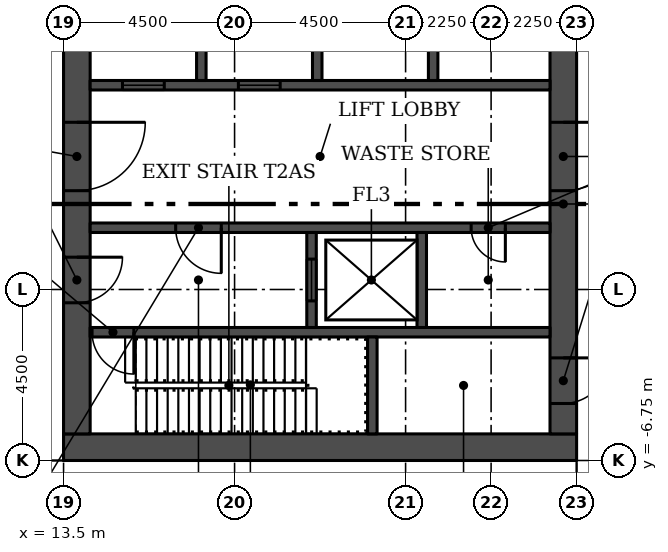
"""IFC4 building model, lengths in metres.
Left out: names, types, materials, properties, quantities, classifications, styles, units other than length and angle.
Written with IfcOpenShell. Run it as: python <this file> out.ifc"""

import sys

from ifc_helpers import new_model, si_unit, direction, frame, frame_2d, origin, place, context, subcontext, project, spatial, rectangle, extrude, element, fill, save


model = new_model("IFC4")
c1 = context("Model", 3, precision=1e-05, world=origin(), true_north=direction((0.0, 1.0)))
c2 = subcontext(c1, "Body", "Model", "MODEL_VIEW")
j1 = project(units=[si_unit("LENGTHUNIT", "METRE"), si_unit("PLANEANGLEUNIT", "RADIAN")], contexts=[c1])
p1 = place(None, origin())
s1 = spatial("IfcSite", under=j1, at=p1, CompositionType="ELEMENT")
p2 = place(p1, origin())
s2 = spatial("IfcBuilding", under=s1, at=p2, CompositionType="ELEMENT")
p3 = place(p2, origin())
s3 = spatial("IfcBuildingStorey", under=s2, at=p3, CompositionType="ELEMENT", Elevation=0.0)
p4 = place(p3, frame((27.0, -6.75, 0.0), z_axis=(0.0, 0.0, 1.0), x_axis=(0.0, -1.0, 0.0)))
e1 = element("IfcWall", 1, at=p4, inside=s3, PredefinedType="PARTITIONING", context=c2, shape_type="SweptSolid", body=[
    extrude(rectangle(XDim=22.375, YDim=0.25, at=frame_2d((11.188, 0.0))), origin(), (0.0, 0.0, 1.0), 12.1),
])
p5 = place(p4, frame((10.05, 0.0, 0.0)))
e2 = element("IfcOpeningElement", 2, at=p5, cuts=e1, PredefinedType="OPENING", context=c2, shape_type="SweptSolid", body=[
    extrude(rectangle(XDim=1.8, YDim=2.4, at=frame_2d((0.9, 1.2))), frame((0.0, 0.135, 0.0), z_axis=(0.0, -1.0, 0.0), x_axis=(1.0, 0.0, 0.0)), (0.0, 0.0, 1.0), 0.27),
])
p6 = place(p3, frame((-13.5, -6.75, 0.0)))
e3 = element("IfcWall", 3, at=p6, inside=s3, PredefinedType="PARTITIONING", context=c2, shape_type="SweptSolid", body=[
    extrude(rectangle(XDim=27.0, YDim=0.25, at=frame_2d((13.5, 0.0))), origin(), (0.0, 0.0, 1.0), 12.1),
])
p7 = place(p6, frame((14.25, 0.0, 0.0)))
e4 = element("IfcOpeningElement", 4, at=p7, cuts=e3, PredefinedType="OPENING", context=c2, shape_type="SweptSolid", body=[
    extrude(rectangle(XDim=1.8, YDim=2.4, at=frame_2d((0.9, 1.2))), frame((0.0, 0.135, 0.0), z_axis=(0.0, -1.0, 0.0), x_axis=(1.0, 0.0, 0.0)), (0.0, 0.0, 1.0), 0.27),
])
p8 = place(p2, frame((0.0, 0.0, 6.5)))
s4 = spatial("IfcBuildingStorey", under=s2, at=p8, CompositionType="ELEMENT", Elevation=6.5)
p9 = place(p8, frame((13.5, -6.4, 0.0)))
e5 = element("IfcWall", 5, at=p9, inside=s4, PredefinedType="SHEAR", context=c2, shape_type="SweptSolid", body=[
    extrude(rectangle(XDim=13.5, YDim=0.7, at=frame_2d((6.75, 0.0))), origin(), (0.0, 0.0, 1.0), 5.6),
])
p10 = place(p8, frame((13.85, 6.05, 0.0), z_axis=(0.0, 0.0, 1.0), x_axis=(0.0, -1.0, 0.0)))
e6 = element("IfcWall", 6, at=p10, inside=s4, PredefinedType="SHEAR", context=c2, shape_type="SweptSolid", body=[
    extrude(rectangle(XDim=12.1, YDim=0.7, at=frame_2d((6.05, 0.0))), origin(), (0.0, 0.0, 1.0), 5.6),
])
p11 = place(p10, frame((7.45, 0.0, 0.0)))
e7 = element("IfcOpeningElement", 7, at=p11, cuts=e6, PredefinedType="OPENING", context=c2, shape_type="SweptSolid", body=[
    extrude(rectangle(XDim=1.2, YDim=2.1, at=frame_2d((0.6, 1.05))), frame((0.0, 0.36, 0.0), z_axis=(0.0, -1.0, 0.0), x_axis=(1.0, 0.0, 0.0)), (0.0, 0.0, 1.0), 0.72),
])
p12 = place(p10, frame((3.9, 0.0, 0.0)))
e8 = element("IfcOpeningElement", 8, at=p12, cuts=e6, PredefinedType="OPENING", context=c2, shape_type="SweptSolid", body=[
    extrude(rectangle(XDim=1.8, YDim=2.4, at=frame_2d((0.9, 1.2))), frame((0.0, 0.36, 0.0), z_axis=(0.0, -1.0, 0.0), x_axis=(1.0, 0.0, 0.0)), (0.0, 0.0, 1.0), 0.72),
])
p13 = place(p8, frame((26.65, 6.05, 0.0), z_axis=(0.0, 0.0, 1.0), x_axis=(0.0, -1.0, 0.0)))
e9 = element("IfcWall", 9, at=p13, inside=s4, PredefinedType="SHEAR", context=c2, shape_type="SweptSolid", body=[
    extrude(rectangle(XDim=12.1, YDim=0.7, at=frame_2d((6.05, 0.0))), origin(), (0.0, 0.0, 1.0), 5.6),
])
p14 = place(p13, frame((10.1, 0.0, 0.0)))
e10 = element("IfcOpeningElement", 10, at=p14, cuts=e9, PredefinedType="OPENING", context=c2, shape_type="SweptSolid", body=[
    extrude(rectangle(XDim=1.2, YDim=2.1, at=frame_2d((0.6, 1.05))), frame((0.0, 0.36, 0.0), z_axis=(0.0, -1.0, 0.0), x_axis=(1.0, 0.0, 0.0)), (0.0, 0.0, 1.0), 0.72),
])
p15 = place(p13, frame((3.9, 0.0, 0.0)))
e11 = element("IfcOpeningElement", 11, at=p15, cuts=e9, PredefinedType="OPENING", context=c2, shape_type="SweptSolid", body=[
    extrude(rectangle(XDim=1.8, YDim=2.4, at=frame_2d((0.9, 1.2))), frame((0.0, 0.36, 0.0), z_axis=(0.0, -1.0, 0.0), x_axis=(1.0, 0.0, 0.0)), (0.0, 0.0, 1.0), 0.72),
])
p16 = place(p8, frame((26.3, -3.375, 0.0), z_axis=(0.0, 0.0, 1.0), x_axis=(-1.0, 0.0, 0.0)))
e12 = element("IfcWall", 12, at=p16, inside=s4, PredefinedType="SHEAR", context=c2, shape_type="SweptSolid", body=[
    extrude(rectangle(XDim=12.1, YDim=0.25, at=frame_2d((6.05, 0.0))), origin(), (0.0, 0.0, 1.0), 5.6),
])
p17 = place(p16, frame((10.95, 0.0, 0.0)))
e13 = element("IfcOpeningElement", 13, at=p17, cuts=e12, PredefinedType="OPENING", context=c2, shape_type="SweptSolid", body=[
    extrude(rectangle(XDim=1.1, YDim=2.1, at=frame_2d((0.55, 1.05))), frame((0.0, 0.135, 0.0), z_axis=(0.0, -1.0, 0.0), x_axis=(1.0, 0.0, 0.0)), (0.0, 0.0, 1.0), 0.27),
])
p18 = place(p8, frame((21.625, -6.05, 0.0), z_axis=(0.0, 0.0, 1.0), x_axis=(0.0, 1.0, 0.0)))
e14 = element("IfcWall", 14, at=p18, inside=s4, PredefinedType="SHEAR", context=c2, shape_type="SweptSolid", body=[
    extrude(rectangle(XDim=2.55, YDim=0.25, at=frame_2d((1.275, 0.0))), origin(), (0.0, 0.0, 1.0), 5.6),
])
p19 = place(p8, frame((26.3, -0.625, 0.0), z_axis=(0.0, 0.0, 1.0), x_axis=(-1.0, 0.0, 0.0)))
e15 = element("IfcWall", 15, at=p19, inside=s4, PredefinedType="SHEAR", context=c2, shape_type="SweptSolid", body=[
    extrude(rectangle(XDim=12.1, YDim=0.25, at=frame_2d((6.05, 0.0))), origin(), (0.0, 0.0, 1.0), 5.6),
])
p20 = place(p19, frame((8.65, 0.0, 0.0)))
e16 = element("IfcOpeningElement", 16, at=p20, cuts=e15, PredefinedType="OPENING", context=c2, shape_type="SweptSolid", body=[
    extrude(rectangle(XDim=1.2, YDim=2.1, at=frame_2d((0.6, 1.05))), frame((0.0, 0.135, 0.0), z_axis=(0.0, -1.0, 0.0), x_axis=(1.0, 0.0, 0.0)), (0.0, 0.0, 1.0), 0.27),
])
p21 = place(p19, frame((1.175, 0.0, 0.0)))
e17 = element("IfcOpeningElement", 17, at=p21, cuts=e15, PredefinedType="OPENING", context=c2, shape_type="SweptSolid", body=[
    extrude(rectangle(XDim=0.9, YDim=2.1, at=frame_2d((0.45, 1.05))), frame((0.0, 0.135, 0.0), z_axis=(0.0, -1.0, 0.0), x_axis=(1.0, 0.0, 0.0)), (0.0, 0.0, 1.0), 0.27),
])
p22 = place(p8, frame((20.025, -3.25, 0.0), z_axis=(0.0, 0.0, 1.0), x_axis=(0.0, 1.0, 0.0)))
e18 = element("IfcWall", 18, at=p22, inside=s4, PredefinedType="SHEAR", context=c2, shape_type="SweptSolid", body=[
    extrude(rectangle(XDim=2.5, YDim=0.25, at=frame_2d((1.25, 0.0))), origin(), (0.0, 0.0, 1.0), 5.6),
])
p23 = place(p22, frame((0.7, 0.0, 0.0)))
e19 = element("IfcOpeningElement", 19, at=p23, cuts=e18, PredefinedType="OPENING", context=c2, shape_type="SweptSolid", body=[
    extrude(rectangle(XDim=1.1, YDim=2.1, at=frame_2d((0.55, 1.05))), frame((0.0, 0.135, 0.0), z_axis=(0.0, -1.0, 0.0), x_axis=(1.0, 0.0, 0.0)), (0.0, 0.0, 1.0), 0.27),
])
p24 = place(p8, frame((22.925, -3.25, 0.0), z_axis=(0.0, 0.0, 1.0), x_axis=(0.0, 1.0, 0.0)))
e20 = element("IfcWall", 20, at=p24, inside=s4, PredefinedType="SHEAR", context=c2, shape_type="SweptSolid", body=[
    extrude(rectangle(XDim=2.5, YDim=0.25, at=frame_2d((1.25, 0.0))), origin(), (0.0, 0.0, 1.0), 5.6),
])
p25 = place(p8, frame((14.2, 3.125, 0.0)))
e21 = element("IfcWall", 21, at=p25, inside=s4, PredefinedType="SHEAR", context=c2, shape_type="SweptSolid", body=[
    extrude(rectangle(XDim=12.1, YDim=0.25, at=frame_2d((6.05, 0.0))), origin(), (0.0, 0.0, 1.0), 5.6),
])
p26 = place(p25, frame((0.85, 0.0, 0.0)))
e22 = element("IfcOpeningElement", 22, at=p26, cuts=e21, PredefinedType="OPENING", context=c2, shape_type="SweptSolid", body=[
    extrude(rectangle(XDim=1.1, YDim=2.1, at=frame_2d((0.55, 1.05))), frame((0.0, 0.135, 0.0), z_axis=(0.0, -1.0, 0.0), x_axis=(1.0, 0.0, 0.0)), (0.0, 0.0, 1.0), 0.27),
])
p27 = place(p25, frame((3.9, 0.0, 0.0)))
e23 = element("IfcOpeningElement", 23, at=p27, cuts=e21, PredefinedType="OPENING", context=c2, shape_type="SweptSolid", body=[
    extrude(rectangle(XDim=1.1, YDim=2.1, at=frame_2d((0.55, 1.05))), frame((0.0, 0.135, 0.0), z_axis=(0.0, -1.0, 0.0), x_axis=(1.0, 0.0, 0.0)), (0.0, 0.0, 1.0), 0.27),
])
for number, where, z_axis, x_axis in (
    (24, (17.125, 3.25, 0.0), (0.0, 0.0, 1.0), (0.0, 1.0, 0.0)),
    (25, (20.175, 3.25, 0.0), (0.0, 0.0, 1.0), (0.0, 1.0, 0.0)),
    (26, (23.225, 3.25, 0.0), (0.0, 0.0, 1.0), (0.0, 1.0, 0.0)),
):
    element("IfcWall", number, at=place(p8, frame(where, z_axis=z_axis, x_axis=x_axis)), inside=s4, PredefinedType="SHEAR", context=c2, shape_type="SweptSolid", body=[
        extrude(rectangle(XDim=2.8, YDim=0.25, at=frame_2d((1.4, 0.0))), origin(), (0.0, 0.0, 1.0), 5.6),
    ])
p28 = place(p11, origin())
e27 = element("IfcDoor", 27, at=p28, inside=s4, OperationType="SINGLE_SWING_RIGHT", PredefinedType="DOOR", context=c2, shape_type="SweptSolid", body=[
    extrude(rectangle(XDim=1.2, YDim=2.1, at=frame_2d((0.6, 1.05))), frame((0.0, 0.025, 0.0), z_axis=(0.0, -1.0, 0.0), x_axis=(1.0, 0.0, 0.0)), (0.0, 0.0, 1.0), 0.05),
])
fill(e7, e27)
p29 = place(p12, origin())
e28 = element("IfcDoor", 28, at=p29, inside=s4, OperationType="DOUBLE_DOOR_SINGLE_SWING", PredefinedType="DOOR", context=c2, shape_type="SweptSolid", body=[
    extrude(rectangle(XDim=1.8, YDim=2.4, at=frame_2d((0.9, 1.2))), frame((0.0, 0.025, 0.0), z_axis=(0.0, -1.0, 0.0), x_axis=(1.0, 0.0, 0.0)), (0.0, 0.0, 1.0), 0.05),
])
fill(e8, e28)
p30 = place(p14, origin())
e29 = element("IfcDoor", 29, at=p30, inside=s4, OperationType="SINGLE_SWING_RIGHT", PredefinedType="DOOR", context=c2, shape_type="SweptSolid", body=[
    extrude(rectangle(XDim=1.2, YDim=2.1, at=frame_2d((0.6, 1.05))), frame((0.0, 0.025, 0.0), z_axis=(0.0, -1.0, 0.0), x_axis=(1.0, 0.0, 0.0)), (0.0, 0.0, 1.0), 0.05),
])
fill(e10, e29)
p31 = place(p15, origin())
e30 = element("IfcDoor", 30, at=p31, inside=s4, OperationType="DOUBLE_DOOR_SINGLE_SWING", PredefinedType="DOOR", context=c2, shape_type="SweptSolid", body=[
    extrude(rectangle(XDim=1.8, YDim=2.4, at=frame_2d((0.9, 1.2))), frame((0.0, 0.025, 0.0), z_axis=(0.0, -1.0, 0.0), x_axis=(1.0, 0.0, 0.0)), (0.0, 0.0, 1.0), 0.05),
])
fill(e11, e30)
p32 = place(p17, origin())
e31 = element("IfcDoor", 31, at=p32, inside=s4, OperationType="SINGLE_SWING_RIGHT", PredefinedType="DOOR", context=c2, shape_type="SweptSolid", body=[
    extrude(rectangle(XDim=1.1, YDim=2.1, at=frame_2d((0.55, 1.05))), frame((0.0, 0.025, 0.0), z_axis=(0.0, -1.0, 0.0), x_axis=(1.0, 0.0, 0.0)), (0.0, 0.0, 1.0), 0.05),
])
fill(e13, e31)
p33 = place(p20, origin())
e32 = element("IfcDoor", 32, at=p33, inside=s4, OperationType="SINGLE_SWING_RIGHT", PredefinedType="DOOR", context=c2, shape_type="SweptSolid", body=[
    extrude(rectangle(XDim=1.2, YDim=2.1, at=frame_2d((0.6, 1.05))), frame((0.0, 0.025, 0.0), z_axis=(0.0, -1.0, 0.0), x_axis=(1.0, 0.0, 0.0)), (0.0, 0.0, 1.0), 0.05),
])
fill(e16, e32)
p34 = place(p21, origin())
e33 = element("IfcDoor", 33, at=p34, inside=s4, OperationType="SINGLE_SWING_LEFT", PredefinedType="DOOR", context=c2, shape_type="SweptSolid", body=[
    extrude(rectangle(XDim=0.9, YDim=2.1, at=frame_2d((0.45, 1.05))), frame((0.0, 0.025, 0.0), z_axis=(0.0, -1.0, 0.0), x_axis=(1.0, 0.0, 0.0)), (0.0, 0.0, 1.0), 0.05),
])
fill(e17, e33)
p35 = place(p23, origin())
e34 = element("IfcDoor", 34, at=p35, inside=s4, OperationType="SLIDING_TO_LEFT", PredefinedType="DOOR", context=c2, shape_type="SweptSolid", body=[
    extrude(rectangle(XDim=1.1, YDim=2.1, at=frame_2d((0.55, 1.05))), frame((0.0, 0.025, 0.0), z_axis=(0.0, -1.0, 0.0), x_axis=(1.0, 0.0, 0.0)), (0.0, 0.0, 1.0), 0.05),
])
fill(e19, e34)
p36 = place(p26, origin())
e35 = element("IfcDoor", 35, at=p36, inside=s4, OperationType="SLIDING_TO_LEFT", PredefinedType="DOOR", context=c2, shape_type="SweptSolid", body=[
    extrude(rectangle(XDim=1.1, YDim=2.1, at=frame_2d((0.55, 1.05))), frame((0.0, 0.025, 0.0), z_axis=(0.0, -1.0, 0.0), x_axis=(1.0, 0.0, 0.0)), (0.0, 0.0, 1.0), 0.05),
])
fill(e22, e35)
p37 = place(p27, origin())
e36 = element("IfcDoor", 36, at=p37, inside=s4, OperationType="SLIDING_TO_LEFT", PredefinedType="DOOR", context=c2, shape_type="SweptSolid", body=[
    extrude(rectangle(XDim=1.1, YDim=2.1, at=frame_2d((0.55, 1.05))), frame((0.0, 0.025, 0.0), z_axis=(0.0, -1.0, 0.0), x_axis=(1.0, 0.0, 0.0)), (0.0, 0.0, 1.0), 0.05),
])
fill(e23, e36)
save(model, sys.argv[1])
